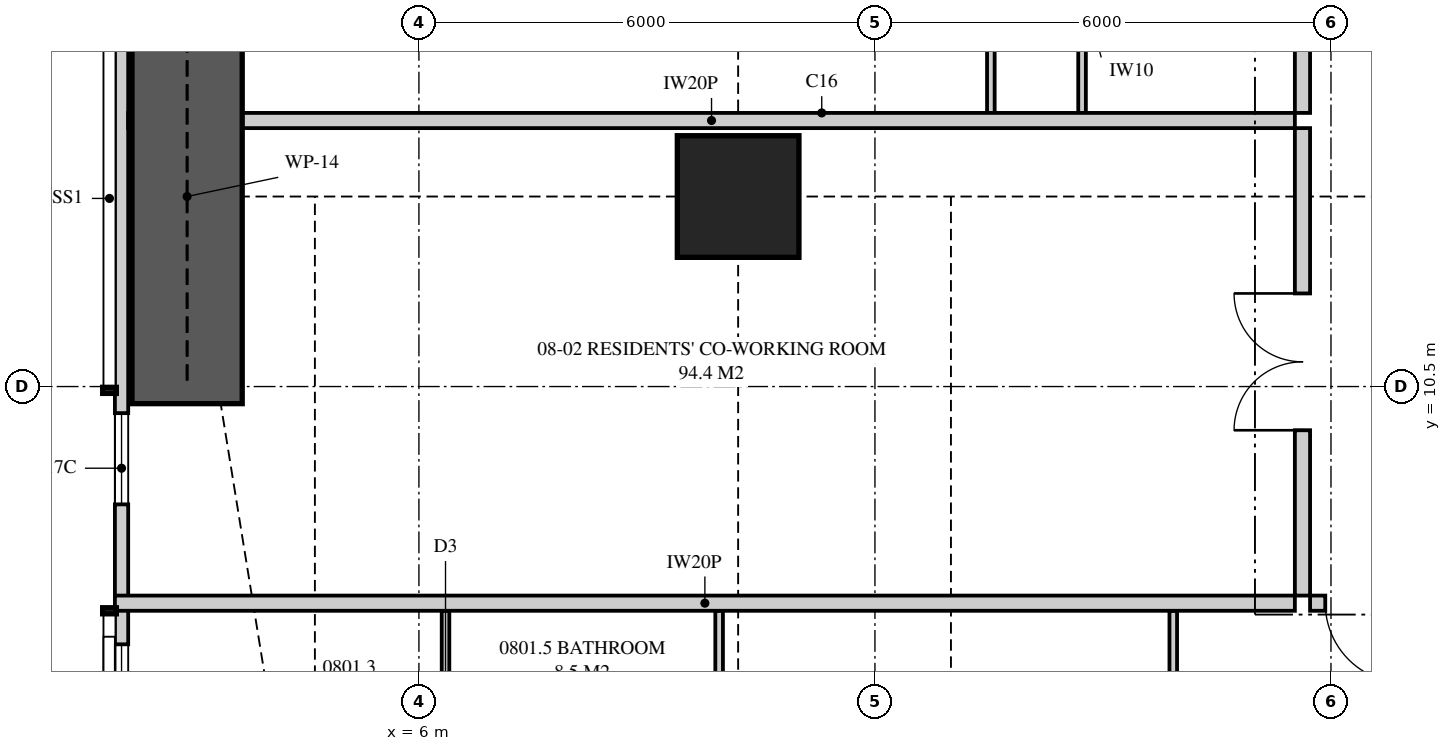
"""IFC4 building model, lengths in metres.
Left out: names, types, materials, properties, quantities, classifications, styles, units other than length and angle.
Written with IfcOpenShell. Run it as: python <this file> out.ifc"""

import sys

from ifc_helpers import new_model, si_unit, direction, frame, frame_2d, origin, origin_2d, place, context, subcontext, project, spatial, polyline, rectangle, outline, extrude, element, fill, save


model = new_model("IFC4")
c1 = context("Model", 3, precision=1e-05, world=origin(), true_north=direction((0.0, 1.0)))
c2 = subcontext(c1, "Body", "Model", "MODEL_VIEW")
j1 = project(units=[si_unit("LENGTHUNIT", "METRE"), si_unit("PLANEANGLEUNIT", "RADIAN")], contexts=[c1])
p1 = place(None, origin())
s1 = spatial("IfcSite", under=j1, at=p1, CompositionType="ELEMENT")
p2 = place(p1, origin())
s2 = spatial("IfcBuilding", under=s1, at=p2, CompositionType="ELEMENT")
p3 = place(p2, frame((0.0, 0.0, 34.4)))
s3 = spatial("IfcBuildingStorey", under=s2, at=p3, CompositionType="ELEMENT", Elevation=34.4)
p4 = place(p3, frame((10.2, 13.0, 0.0), z_axis=(0.0, 0.0, 1.0), x_axis=(1.0, 0.0, 0.0)))
e1 = element("IfcColumn", 1, at=p4, inside=s3, PredefinedType="COLUMN", context=c2, shape_type="SweptSolid", body=[
    extrude(rectangle(XDim=1.6, YDim=1.6, at=origin_2d()), origin(), (0.0, 0.0, 1.0), 3.35),
])
p5 = place(p3, frame((2.087, 15.8, 0.0), z_axis=(0.0, 0.0, 1.0), x_axis=(0.0, -1.0, 0.0)))
e2 = element("IfcWall", 2, at=p5, inside=s3, PredefinedType="SOLIDWALL", context=c2, shape_type="SweptSolid", body=[
    extrude(outline(polyline([(0.0, 0.0), (12.749, 0.0), (12.749, 3.11), (3.019, 3.11), (3.019, 2.15), (2.926, 2.15), (2.926, 3.11), (2.8, 3.11), (2.8, 2.15), (0.0, 2.15), (0.0, 0.0)])), frame((0.0, 0.087, 0.0), z_axis=(0.0, -1.0, 0.0), x_axis=(1.0, 0.0, 0.0)), (0.0, 0.0, 1.0), 0.175),
])
p6 = place(p5, frame((5.65, 0.0, 0.4)))
e3 = element("IfcOpeningElement", 3, at=p6, cuts=e2, PredefinedType="OPENING", context=c2, shape_type="SweptSolid", body=[
    extrude(rectangle(XDim=1.2, YDim=1.7, at=frame_2d((0.6, 0.85))), frame((0.0, 0.097, 0.0), z_axis=(0.0, -1.0, 0.0), x_axis=(1.0, 0.0, 0.0)), (0.0, 0.0, 1.0), 0.195),
])
p7 = place(p5, frame((8.691, 0.0, 0.4)))
e4 = element("IfcOpeningElement", 4, at=p7, cuts=e2, PredefinedType="OPENING", context=c2, shape_type="SweptSolid", body=[
    extrude(rectangle(XDim=1.8, YDim=1.7, at=frame_2d((0.9, 0.85))), frame((0.0, 0.097, 0.0), z_axis=(0.0, -1.0, 0.0), x_axis=(1.0, 0.0, 0.0)), (0.0, 0.0, 1.0), 0.195),
])
p8 = place(p3, frame((17.725, 7.65, 0.0), z_axis=(0.0, 0.0, 1.0), x_axis=(1.0, 0.0, 0.0)))
e5 = element("IfcWall", 5, at=p8, inside=s3, PredefinedType="PARTITIONING", context=c2, shape_type="SweptSolid", body=[
    extrude(rectangle(XDim=4.125, YDim=0.2, at=frame_2d((2.062, 0.0))), origin(), (0.0, 0.0, 1.0), 3.11),
])
p9 = place(p8, frame((0.2, 0.0, 0.0)))
e6 = element("IfcOpeningElement", 6, at=p9, cuts=e5, PredefinedType="OPENING", context=c2, shape_type="SweptSolid", body=[
    extrude(rectangle(XDim=1.05, YDim=2.2, at=frame_2d((0.525, 1.1))), frame((0.0, 0.11, 0.0), z_axis=(0.0, -1.0, 0.0), x_axis=(1.0, 0.0, 0.0)), (0.0, 0.0, 1.0), 0.22),
])
p10 = place(p3, frame((6.35, 0.175, 0.0), z_axis=(0.0, 0.0, 1.0), x_axis=(0.0, 1.0, 0.0)))
e7 = element("IfcWall", 7, at=p10, inside=s3, PredefinedType="PARTITIONING", context=c2, shape_type="SweptSolid", body=[
    extrude(outline(polyline([(0.0, 0.0), (7.375, 0.0), (7.375, 3.11), (2.988, 3.11), (2.988, 2.15), (1.234, 2.15), (1.234, 3.11), (0.0, 3.11), (0.0, 0.0)])), frame((0.0, 0.05, 0.0), z_axis=(0.0, -1.0, 0.0), x_axis=(1.0, 0.0, 0.0)), (0.0, 0.0, 1.0), 0.1),
])
p11 = place(p10, frame((3.492, 0.0, 0.0)))
e8 = element("IfcOpeningElement", 8, at=p11, cuts=e7, PredefinedType="OPENING", context=c2, shape_type="SweptSolid", body=[
    extrude(rectangle(XDim=0.9, YDim=2.1, at=frame_2d((0.45, 1.05))), frame((0.0, 0.06, 0.0), z_axis=(0.0, -1.0, 0.0), x_axis=(1.0, 0.0, 0.0)), (0.0, 0.0, 1.0), 0.12),
])
p12 = place(p10, frame((5.559, 0.0, 0.0)))
e9 = element("IfcOpeningElement", 9, at=p12, cuts=e7, PredefinedType="OPENING", context=c2, shape_type="SweptSolid", body=[
    extrude(rectangle(XDim=0.9, YDim=2.1, at=frame_2d((0.45, 1.05))), frame((0.0, 0.06, 0.0), z_axis=(0.0, -1.0, 0.0), x_axis=(1.0, 0.0, 0.0)), (0.0, 0.0, 1.0), 0.12),
])
p13 = place(p3, frame((9.95, 1.513, 0.0), z_axis=(0.0, 0.0, 1.0), x_axis=(0.0, 1.0, 0.0)))
e10 = element("IfcWall", 10, at=p13, inside=s3, PredefinedType="PARTITIONING", context=c2, shape_type="SweptSolid", body=[
    extrude(outline(polyline([(0.0, 0.0), (6.037, 0.0), (6.037, 2.51), (0.927, 2.51), (0.927, 2.15), (0.0, 2.15), (0.0, 0.0)])), frame((0.0, 0.05, 0.0), z_axis=(0.0, -1.0, 0.0), x_axis=(1.0, 0.0, 0.0)), (0.0, 0.0, 1.0), 0.1),
])
p14 = place(p13, frame((2.188, 0.0, 0.0)))
e11 = element("IfcOpeningElement", 11, at=p14, cuts=e10, PredefinedType="OPENING", context=c2, shape_type="SweptSolid", body=[
    extrude(rectangle(XDim=0.9, YDim=2.1, at=frame_2d((0.45, 1.05))), frame((0.0, 0.06, 0.0), z_axis=(0.0, -1.0, 0.0), x_axis=(1.0, 0.0, 0.0)), (0.0, 0.0, 1.0), 0.12),
])
p15 = place(p13, frame((3.612, 0.0, 0.0)))
e12 = element("IfcOpeningElement", 12, at=p15, cuts=e10, PredefinedType="OPENING", context=c2, shape_type="SweptSolid", body=[
    extrude(rectangle(XDim=0.9, YDim=2.1, at=frame_2d((0.45, 1.05))), frame((0.0, 0.06, 0.0), z_axis=(0.0, -1.0, 0.0), x_axis=(1.0, 0.0, 0.0)), (0.0, 0.0, 1.0), 0.12),
])
p16 = place(p3, frame((15.925, 0.175, 0.0), z_axis=(0.0, 0.0, 1.0), x_axis=(0.0, 1.0, 0.0)))
e13 = element("IfcWall", 13, at=p16, inside=s3, PredefinedType="PARTITIONING", context=c2, shape_type="SweptSolid", body=[
    extrude(outline(polyline([(0.0, 0.0), (7.375, 0.0), (7.375, 3.11), (1.635, 3.11), (1.635, 2.15), (0.0, 2.15), (0.0, 3.11), (0.0, 0.0)])), frame((0.0, 0.05, 0.0), z_axis=(0.0, -1.0, 0.0), x_axis=(1.0, 0.0, 0.0)), (0.0, 0.0, 1.0), 0.1),
])
p17 = place(p16, frame((3.188, 0.0, 0.0)))
e14 = element("IfcOpeningElement", 14, at=p17, cuts=e13, PredefinedType="OPENING", context=c2, shape_type="SweptSolid", body=[
    extrude(rectangle(XDim=1.0, YDim=2.1, at=frame_2d((0.5, 1.05))), frame((0.0, 0.06, 0.0), z_axis=(0.0, -1.0, 0.0), x_axis=(1.0, 0.0, 0.0)), (0.0, 0.0, 1.0), 0.12),
])
p18 = place(p3, frame((2.0, 7.65, 0.0), z_axis=(0.0, 0.0, 1.0), x_axis=(1.0, 0.0, 0.0)))
e15 = element("IfcWall", 15, at=p18, inside=s3, PredefinedType="PARTITIONING", context=c2, shape_type="SweptSolid", body=[
    extrude(outline(polyline([(0.0, 0.0), (15.525, 0.0), (15.525, 3.11), (11.337, 3.11), (11.337, 2.541), (10.663, 2.541), (10.663, 3.11), (9.51, 3.11), (9.51, 2.51), (6.89, 2.51), (6.89, 3.11), (2.969, 3.11), (2.969, 2.541), (2.74, 2.541), (2.74, 2.15), (0.896, 2.15), (0.896, 3.11), (0.0, 3.11), (0.0, 0.0)])), frame((0.0, 0.1, 0.0), z_axis=(0.0, -1.0, 0.0), x_axis=(1.0, 0.0, 0.0)), (0.0, 0.0, 1.0), 0.2),
])
p19 = place(p3, frame((2.175, 14.0, 0.0), z_axis=(0.0, 0.0, 1.0), x_axis=(1.0, 0.0, 0.0)))
e16 = element("IfcWall", 16, at=p19, inside=s3, PredefinedType="PARTITIONING", context=c2, shape_type="SweptSolid", body=[
    extrude(outline(polyline([(0.529, 2.15), (0.0, 2.15), (0.0, 0.0), (0.529, 0.0), (0.529, 0.815), (1.021, 0.815), (1.021, 0.0), (15.35, 0.0), (15.35, 3.11), (9.335, 3.11), (9.335, 2.51), (6.715, 2.51), (6.715, 3.11), (1.685, 3.11), (1.685, 2.15), (1.021, 2.15), (1.021, 1.335), (0.529, 1.335), (0.529, 2.15)])), frame((0.0, 0.1, 0.0), z_axis=(0.0, -1.0, 0.0), x_axis=(1.0, 0.0, 0.0)), (0.0, 0.0, 1.0), 0.2),
])
p20 = place(p3, frame((17.625, 7.75, 0.0), z_axis=(0.0, 0.0, 1.0), x_axis=(0.0, 1.0, 0.0)))
e17 = element("IfcWall", 17, at=p20, inside=s3, PredefinedType="PARTITIONING", context=c2, shape_type="SweptSolid", body=[
    extrude(outline(polyline([(0.0, 0.0), (6.15, 0.0), (6.15, 3.11), (5.587, 3.11), (5.587, 2.541), (4.913, 2.541), (4.913, 3.11), (0.0, 3.11), (0.0, 0.0)])), frame((0.0, 0.1, 0.0), z_axis=(0.0, -1.0, 0.0), x_axis=(1.0, 0.0, 0.0)), (0.0, 0.0, 1.0), 0.2),
])
p21 = place(p20, frame((2.175, 0.0, 0.0)))
e18 = element("IfcOpeningElement", 18, at=p21, cuts=e17, PredefinedType="OPENING", context=c2, shape_type="SweptSolid", body=[
    extrude(rectangle(XDim=1.8, YDim=2.1, at=frame_2d((0.9, 1.05))), frame((0.0, 0.11, 0.0), z_axis=(0.0, -1.0, 0.0), x_axis=(1.0, 0.0, 0.0)), (0.0, 0.0, 1.0), 0.22),
])
p22 = place(p3, frame((17.625, 14.1, 0.0), z_axis=(0.0, 0.0, 1.0), x_axis=(0.0, 1.0, 0.0)))
e19 = element("IfcWall", 19, at=p22, inside=s3, PredefinedType="PARTITIONING", context=c2, shape_type="SweptSolid", body=[
    extrude(rectangle(XDim=9.8, YDim=0.2, at=frame_2d((4.9, 0.0))), origin(), (0.0, 0.0, 1.0), 3.11),
])
p23 = place(p22, frame((4.4, 0.0, 0.0)))
e20 = element("IfcOpeningElement", 20, at=p23, cuts=e19, PredefinedType="OPENING", context=c2, shape_type="SweptSolid", body=[
    extrude(rectangle(XDim=1.05, YDim=2.2, at=frame_2d((0.525, 1.1))), frame((0.0, 0.11, 0.0), z_axis=(0.0, -1.0, 0.0), x_axis=(1.0, 0.0, 0.0)), (0.0, 0.0, 1.0), 0.22),
])
p24 = place(p3, frame((13.525, 14.1, 0.0), z_axis=(0.0, 0.0, 1.0), x_axis=(0.0, 1.0, 0.0)))
e21 = element("IfcWall", 21, at=p24, inside=s3, PredefinedType="PARTITIONING", context=c2, shape_type="SweptSolid", body=[
    extrude(rectangle(XDim=5.8, YDim=0.1, at=frame_2d((2.9, 0.0))), origin(), (0.0, 0.0, 1.0), 3.11),
])
p25 = place(p24, frame((4.4, 0.0, 0.0)))
e22 = element("IfcOpeningElement", 22, at=p25, cuts=e21, PredefinedType="OPENING", context=c2, shape_type="SweptSolid", body=[
    extrude(rectangle(XDim=1.0, YDim=2.1, at=frame_2d((0.5, 1.05))), frame((0.0, 0.06, 0.0), z_axis=(0.0, -1.0, 0.0), x_axis=(1.0, 0.0, 0.0)), (0.0, 0.0, 1.0), 0.12),
])
p26 = place(p3, frame((14.725, 14.1, 0.0), z_axis=(0.0, 0.0, 1.0), x_axis=(0.0, 1.0, 0.0)))
e23 = element("IfcWall", 23, at=p26, inside=s3, PredefinedType="PARTITIONING", context=c2, shape_type="SweptSolid", body=[
    extrude(rectangle(XDim=3.35, YDim=0.1, at=frame_2d((1.675, 0.0))), origin(), (0.0, 0.0, 1.0), 3.11),
])
p27 = place(p3, frame((2.95, 10.275, 0.0), z_axis=(0.0, 0.0, 1.0), x_axis=(0.0, 1.0, 0.0)))
e24 = element("IfcWall", 24, at=p27, inside=s3, PredefinedType="SHEAR", context=c2, shape_type="SweptSolid", body=[
    extrude(rectangle(XDim=5.45, YDim=1.45, at=frame_2d((2.725, 0.0))), origin(), (0.0, 0.0, 1.0), 3.35),
])
p28 = place(p6, origin())
e25 = element("IfcWindow", 25, at=p28, inside=s3, PartitioningType="SINGLE_PANEL", PredefinedType="WINDOW", context=c2, shape_type="SweptSolid", body=[
    extrude(rectangle(XDim=1.2, YDim=1.7, at=frame_2d((0.6, 0.85))), frame((0.0, 0.03, 0.0), z_axis=(0.0, -1.0, 0.0), x_axis=(1.0, 0.0, 0.0)), (0.0, 0.0, 1.0), 0.06),
])
fill(e3, e25)
p29 = place(p7, origin())
e26 = element("IfcWindow", 26, at=p29, inside=s3, PartitioningType="SINGLE_PANEL", PredefinedType="WINDOW", context=c2, shape_type="SweptSolid", body=[
    extrude(rectangle(XDim=1.8, YDim=1.7, at=frame_2d((0.9, 0.85))), frame((0.0, 0.03, 0.0), z_axis=(0.0, -1.0, 0.0), x_axis=(1.0, 0.0, 0.0)), (0.0, 0.0, 1.0), 0.06),
])
fill(e4, e26)
p30 = place(p9, frame((1.05, 0.0, 0.0), z_axis=(0.0, 0.0, 1.0), x_axis=(-1.0, 0.0, 0.0)))
e27 = element("IfcDoor", 27, at=p30, inside=s3, OperationType="SINGLE_SWING_LEFT", PredefinedType="DOOR", context=c2, shape_type="SweptSolid", body=[
    extrude(rectangle(XDim=1.05, YDim=2.2, at=frame_2d((0.525, 1.1))), frame((0.0, 0.025, 0.0), z_axis=(0.0, -1.0, 0.0), x_axis=(1.0, 0.0, 0.0)), (0.0, 0.0, 1.0), 0.05),
])
fill(e6, e27)
p31 = place(p21, origin())
e28 = element("IfcDoor", 28, at=p31, inside=s3, OperationType="DOUBLE_DOOR_SINGLE_SWING", PredefinedType="DOOR", context=c2, shape_type="SweptSolid", body=[
    extrude(rectangle(XDim=1.8, YDim=2.1, at=frame_2d((0.9, 1.05))), frame((0.0, 0.025, 0.0), z_axis=(0.0, -1.0, 0.0), x_axis=(1.0, 0.0, 0.0)), (0.0, 0.0, 1.0), 0.05),
])
fill(e18, e28)
save(model, sys.argv[1])
